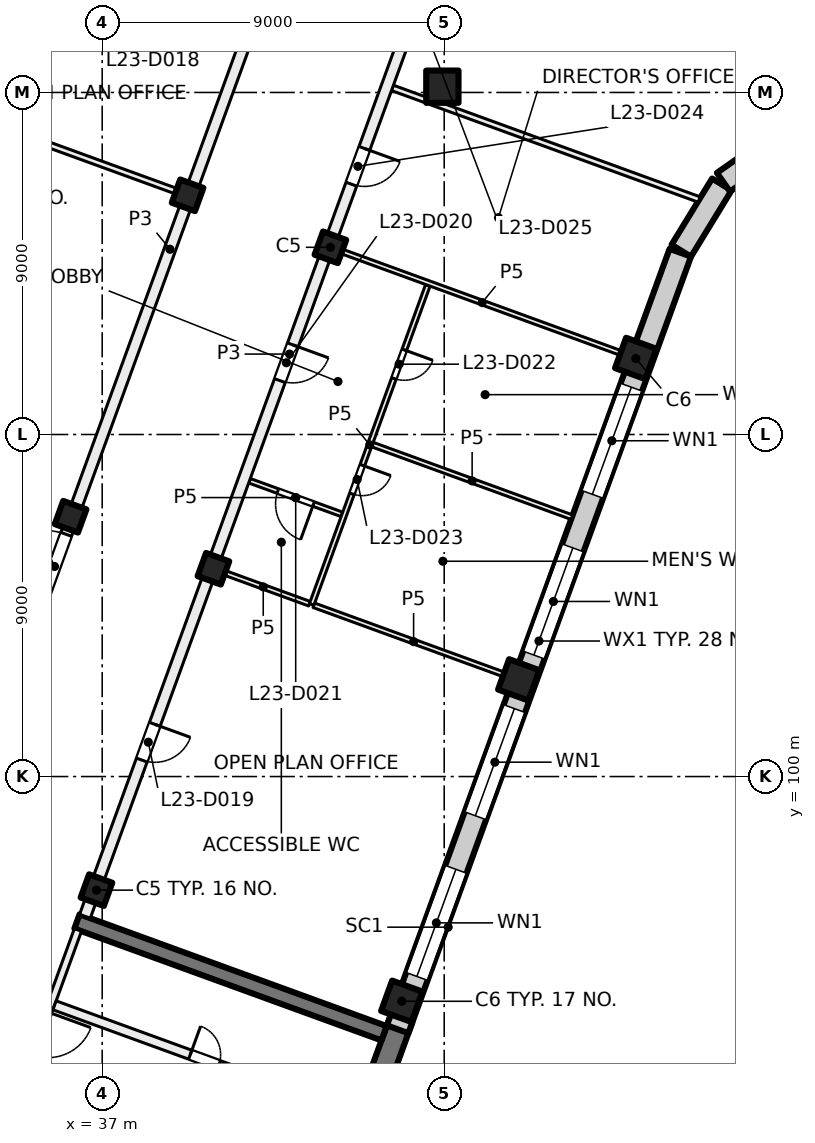
"""IFC4 building model, lengths in metres.
Left out: names, types, materials, properties, quantities, classifications, styles, units other than length and angle.
Written with IfcOpenShell. Run it as: python <this file> out.ifc"""

import sys

from ifc_helpers import new_model, si_unit, direction, frame, frame_2d, origin, origin_2d, place, context, subcontext, project, spatial, rectangle, extrude, element, fill, save


model = new_model("IFC4")
c1 = context("Model", 3, precision=1e-05, world=origin(), true_north=direction((0.0, 1.0)))
c2 = subcontext(c1, "Body", "Model", "MODEL_VIEW")
j1 = project(units=[si_unit("LENGTHUNIT", "METRE"), si_unit("PLANEANGLEUNIT", "RADIAN")], contexts=[c1])
p1 = place(None, origin())
s1 = spatial("IfcSite", under=j1, at=p1, CompositionType="ELEMENT")
p2 = place(p1, origin())
s2 = spatial("IfcBuilding", under=s1, at=p2, CompositionType="ELEMENT")
p3 = place(p2, frame((0.0, 0.0, 101.0)))
s3 = spatial("IfcBuildingStorey", under=s2, at=p3, CompositionType="ELEMENT", Elevation=101.0)
p4 = place(p3, frame((45.952, 118.152, 0.0), z_axis=(0.0, 0.0, 1.0), x_axis=(1.0, 0.0, 0.0)))
e1 = element("IfcColumn", 1, at=p4, inside=s3, PredefinedType="COLUMN", context=c2, shape_type="SweptSolid", body=[
    extrude(rectangle(XDim=0.85, YDim=0.85, at=origin_2d()), origin(), (0.0, 0.0, 1.0), 4.0),
])
for number, where, z_axis, x_axis in (
    (2, (43.006, 113.925, 0.0), (0.0, 0.0, 1.0), (-0.342, -0.94, 0.0)),
    (3, (39.927, 105.468, 0.0), (0.0, 0.0, 1.0), (-0.342, -0.94, 0.0)),
    (4, (36.849, 97.011, 0.0), (0.0, 0.0, 1.0), (-0.342, -0.94, 0.0)),
    (5, (39.247, 115.293, 0.0), (0.0, 0.0, 1.0), (-0.342, -0.94, 0.0)),
    (6, (36.169, 106.836, 0.0), (0.0, 0.0, 1.0), (-0.342, -0.94, 0.0)),
):
    element("IfcColumn", number, at=place(p3, frame(where, z_axis=z_axis, x_axis=x_axis)), inside=s3, PredefinedType="COLUMN", context=c2, shape_type="SweptSolid", body=[
        extrude(rectangle(XDim=0.65, YDim=0.65, at=origin_2d()), origin(), (0.0, 0.0, 1.0), 4.0),
    ])
for number, where, z_axis, x_axis in (
    (7, (51.04, 111.001, 0.0), (0.0, 0.0, 1.0), (-0.342, -0.94, 0.0)),
    (8, (47.962, 102.544, 0.0), (0.0, 0.0, 1.0), (-0.342, -0.94, 0.0)),
    (9, (44.884, 94.087, 0.0), (0.0, 0.0, 1.0), (-0.342, -0.94, 0.0)),
):
    element("IfcColumn", number, at=place(p3, frame(where, z_axis=z_axis, x_axis=x_axis)), inside=s3, PredefinedType="COLUMN", context=c2, shape_type="SweptSolid", body=[
        extrude(rectangle(XDim=0.85, YDim=0.85, at=origin_2d()), origin(), (0.0, 0.0, 1.0), 4.0),
    ])
p5 = place(p3, frame((41.827, 85.249, 0.0), z_axis=(0.0, 0.0, 1.0), x_axis=(0.342017595281, 0.939693548195, 0.0)))
e10 = element("IfcWall", 10, at=p5, inside=s3, PredefinedType="SHEAR", context=c2, shape_type="SweptSolid", body=[
    extrude(rectangle(XDim=8.925, YDim=0.6, at=frame_2d((4.462, 0.0))), origin(), (0.0, 0.0, 1.0), 4.0),
])
p6 = place(p3, frame((44.418, 93.245, 0.0), z_axis=(0.0, 0.0, 1.0), x_axis=(-0.93969060187, 0.342025690201, 0.0)))
e11 = element("IfcWall", 11, at=p6, inside=s3, PredefinedType="SHEAR", context=c2, shape_type="SweptSolid", body=[
    extrude(rectangle(XDim=8.6, YDim=0.4, at=frame_2d((4.3, 0.0))), origin(), (0.0, 0.0, 1.0), 4.0),
])
p7 = place(p3, frame((52.212, 113.783, 0.0), z_axis=(0.0, 0.0, 1.0), x_axis=(-0.34202521188, -0.939690775968, 0.0)))
e12 = element("IfcWall", 12, at=p7, inside=s3, PredefinedType="SOLIDWALL", context=c2, shape_type="SweptSolid", body=[
    extrude(rectangle(XDim=21.745, YDim=0.6, at=frame_2d((10.873, 0.0))), origin(), (0.0, 0.0, 1.0), 3.625),
])
p8 = place(p7, frame((3.765, 0.0, 0.9)))
e13 = element("IfcOpeningElement", 13, at=p8, cuts=e12, PredefinedType="OPENING", context=c2, shape_type="SweptSolid", body=[
    extrude(rectangle(XDim=3.0, YDim=2.4, at=frame_2d((1.5, 1.2))), frame((0.0, 0.31, 0.0), z_axis=(0.0, -1.0, 0.0), x_axis=(1.0, 0.0, 0.0)), (0.0, 0.0, 1.0), 0.62),
])
p9 = place(p7, frame((8.265, 0.0, 0.9)))
e14 = element("IfcOpeningElement", 14, at=p9, cuts=e12, PredefinedType="OPENING", context=c2, shape_type="SweptSolid", body=[
    extrude(rectangle(XDim=3.0, YDim=2.4, at=frame_2d((1.5, 1.2))), frame((0.0, 0.31, 0.0), z_axis=(0.0, -1.0, 0.0), x_axis=(1.0, 0.0, 0.0)), (0.0, 0.0, 1.0), 0.62),
])
p10 = place(p7, frame((12.765, 0.0, 0.9)))
e15 = element("IfcOpeningElement", 15, at=p10, cuts=e12, PredefinedType="OPENING", context=c2, shape_type="SweptSolid", body=[
    extrude(rectangle(XDim=3.0, YDim=2.4, at=frame_2d((1.5, 1.2))), frame((0.0, 0.31, 0.0), z_axis=(0.0, -1.0, 0.0), x_axis=(1.0, 0.0, 0.0)), (0.0, 0.0, 1.0), 0.62),
])
p11 = place(p7, frame((17.265, 0.0, 0.9)))
e16 = element("IfcOpeningElement", 16, at=p11, cuts=e12, PredefinedType="OPENING", context=c2, shape_type="SweptSolid", body=[
    extrude(rectangle(XDim=3.0, YDim=2.4, at=frame_2d((1.5, 1.2))), frame((0.0, 0.31, 0.0), z_axis=(0.0, -1.0, 0.0), x_axis=(1.0, 0.0, 0.0)), (0.0, 0.0, 1.0), 0.62),
])
p12 = place(p3, frame((53.305, 115.578, 0.0), z_axis=(0.0, 0.0, 1.0), x_axis=(-0.522402266438, -0.852699168535, 0.0)))
e17 = element("IfcWall", 17, at=p12, inside=s3, PredefinedType="SOLIDWALL", context=c2, shape_type="SweptSolid", body=[
    extrude(rectangle(XDim=2.042, YDim=0.6, at=frame_2d((1.021, 0.0))), origin(), (0.0, 0.0, 1.0), 3.625),
])
p13 = place(p3, frame((55.062, 116.839, 0.0), z_axis=(0.0, 0.0, 1.0), x_axis=(-0.819122269495, -0.573618956815, 0.0)))
e18 = element("IfcWall", 18, at=p13, inside=s3, PredefinedType="SOLIDWALL", context=c2, shape_type="SweptSolid", body=[
    extrude(rectangle(XDim=2.092, YDim=0.6, at=frame_2d((1.046, 0.0))), origin(), (0.0, 0.0, 1.0), 3.625),
])
p14 = place(p3, frame((24.666, 100.669, 0.0), z_axis=(0.0, 0.0, 1.0), x_axis=(0.34201964167, 0.939692803373, 0.0)))
e19 = element("IfcWall", 19, at=p14, inside=s3, PredefinedType="SOLIDWALL", context=c2, shape_type="SweptSolid", body=[
    extrude(rectangle(XDim=32.884, YDim=0.6, at=frame_2d((16.442, 0.0))), origin(), (0.0, 0.0, 1.0), 3.625),
])
p15 = place(p14, frame((1.48, 0.0, 0.9)))
e20 = element("IfcOpeningElement", 20, at=p15, cuts=e19, PredefinedType="OPENING", context=c2, shape_type="SweptSolid", body=[
    extrude(rectangle(XDim=3.0, YDim=2.4, at=frame_2d((1.5, 1.2))), frame((0.0, 0.31, 0.0), z_axis=(0.0, -1.0, 0.0), x_axis=(1.0, 0.0, 0.0)), (0.0, 0.0, 1.0), 0.62),
])
p16 = place(p14, frame((5.98, 0.0, 0.9)))
e21 = element("IfcOpeningElement", 21, at=p16, cuts=e19, PredefinedType="OPENING", context=c2, shape_type="SweptSolid", body=[
    extrude(rectangle(XDim=3.0, YDim=2.4, at=frame_2d((1.5, 1.2))), frame((0.0, 0.31, 0.0), z_axis=(0.0, -1.0, 0.0), x_axis=(1.0, 0.0, 0.0)), (0.0, 0.0, 1.0), 0.62),
])
p17 = place(p14, frame((10.48, 0.0, 0.9)))
e22 = element("IfcOpeningElement", 22, at=p17, cuts=e19, PredefinedType="OPENING", context=c2, shape_type="SweptSolid", body=[
    extrude(rectangle(XDim=3.0, YDim=2.4, at=frame_2d((1.5, 1.2))), frame((0.0, 0.31, 0.0), z_axis=(0.0, -1.0, 0.0), x_axis=(1.0, 0.0, 0.0)), (0.0, 0.0, 1.0), 0.62),
])
p18 = place(p14, frame((14.98, 0.0, 0.9)))
e23 = element("IfcOpeningElement", 23, at=p18, cuts=e19, PredefinedType="OPENING", context=c2, shape_type="SweptSolid", body=[
    extrude(rectangle(XDim=3.0, YDim=2.4, at=frame_2d((1.5, 1.2))), frame((0.0, 0.31, 0.0), z_axis=(0.0, -1.0, 0.0), x_axis=(1.0, 0.0, 0.0)), (0.0, 0.0, 1.0), 0.62),
])
p19 = place(p14, frame((19.48, 0.0, 0.9)))
e24 = element("IfcOpeningElement", 24, at=p19, cuts=e19, PredefinedType="OPENING", context=c2, shape_type="SweptSolid", body=[
    extrude(rectangle(XDim=3.0, YDim=2.4, at=frame_2d((1.5, 1.2))), frame((0.0, 0.31, 0.0), z_axis=(0.0, -1.0, 0.0), x_axis=(1.0, 0.0, 0.0)), (0.0, 0.0, 1.0), 0.62),
])
p20 = place(p14, frame((23.98, 0.0, 0.9)))
e25 = element("IfcOpeningElement", 25, at=p20, cuts=e19, PredefinedType="OPENING", context=c2, shape_type="SweptSolid", body=[
    extrude(rectangle(XDim=3.0, YDim=2.4, at=frame_2d((1.5, 1.2))), frame((0.0, 0.31, 0.0), z_axis=(0.0, -1.0, 0.0), x_axis=(1.0, 0.0, 0.0)), (0.0, 0.0, 1.0), 0.62),
])
p21 = place(p14, frame((28.48, 0.0, 0.9)))
e26 = element("IfcOpeningElement", 26, at=p21, cuts=e19, PredefinedType="OPENING", context=c2, shape_type="SweptSolid", body=[
    extrude(rectangle(XDim=3.0, YDim=2.4, at=frame_2d((1.5, 1.2))), frame((0.0, 0.31, 0.0), z_axis=(0.0, -1.0, 0.0), x_axis=(1.0, 0.0, 0.0)), (0.0, 0.0, 1.0), 0.62),
])
p22 = place(p3, frame((36.362, 95.964, 0.0), z_axis=(0.0, 0.0, 1.0), x_axis=(-0.341995824804, -0.939701471648, 0.0)))
e27 = element("IfcWall", 27, at=p22, inside=s3, PredefinedType="PARTITIONING", context=c2, shape_type="SweptSolid", body=[
    extrude(rectangle(XDim=3.8, YDim=0.2, at=frame_2d((1.9, 0.0))), origin(), (0.0, 0.0, 1.0), 3.625),
])
p23 = place(p22, frame((2.3, 0.0, 0.0)))
e28 = element("IfcOpeningElement", 28, at=p23, cuts=e27, PredefinedType="OPENING", context=c2, shape_type="SweptSolid", body=[
    extrude(rectangle(XDim=1.2, YDim=2.1, at=frame_2d((0.6, 1.05))), frame((0.0, 0.11, 0.0), z_axis=(0.0, -1.0, 0.0), x_axis=(1.0, 0.0, 0.0)), (0.0, 0.0, 1.0), 0.22),
])
p24 = place(p3, frame((35.19, 92.453, 0.0), z_axis=(0.0, 0.0, 1.0), x_axis=(0.939691552312, -0.342023078919, 0.0)))
e29 = element("IfcWall", 29, at=p24, inside=s3, PredefinedType="PARTITIONING", context=c2, shape_type="SweptSolid", body=[
    extrude(rectangle(XDim=8.4, YDim=0.2, at=frame_2d((4.2, 0.0))), origin(), (0.0, 0.0, 1.0), 3.625),
])
p25 = place(p24, frame((5.25, 0.0, 0.0)))
e30 = element("IfcOpeningElement", 30, at=p25, cuts=e29, PredefinedType="OPENING", context=c2, shape_type="SweptSolid", body=[
    extrude(rectangle(XDim=1.5, YDim=2.1, at=frame_2d((0.75, 1.05))), frame((0.0, 0.11, 0.0), z_axis=(0.0, -1.0, 0.0), x_axis=(1.0, 0.0, 0.0)), (0.0, 0.0, 1.0), 0.22),
])
p26 = place(p3, frame((35.746, 93.98, 0.0), z_axis=(0.0, 0.0, 1.0), x_axis=(0.939691552312, -0.342023078919, 0.0)))
e31 = element("IfcWall", 31, at=p26, inside=s3, PredefinedType="PARTITIONING", context=c2, shape_type="SweptSolid", body=[
    extrude(rectangle(XDim=8.4, YDim=0.25, at=frame_2d((4.2, 0.0))), origin(), (0.0, 0.0, 1.0), 3.625),
])
p27 = place(p26, frame((3.8, 0.0, 0.0)))
e32 = element("IfcOpeningElement", 32, at=p27, cuts=e31, PredefinedType="OPENING", context=c2, shape_type="SweptSolid", body=[
    extrude(rectangle(XDim=0.8, YDim=2.1, at=frame_2d((0.4, 1.05))), frame((0.0, 0.135, 0.0), z_axis=(0.0, -1.0, 0.0), x_axis=(1.0, 0.0, 0.0)), (0.0, 0.0, 1.0), 0.27),
])
p28 = place(p3, frame((31.353, 118.166, 0.0), z_axis=(0.0, 0.0, 1.0), x_axis=(0.939687752599, -0.342033518263, 0.0)))
e33 = element("IfcWall", 33, at=p28, inside=s3, PredefinedType="PARTITIONING", context=c2, shape_type="SweptSolid", body=[
    extrude(rectangle(XDim=8.301, YDim=0.15, at=frame_2d((4.15, 0.0))), origin(), (0.0, 0.0, 1.0), 3.625),
])
p29 = place(p3, frame((32.881, 97.657, 0.0), z_axis=(0.0, 0.0, 1.0), x_axis=(0.342017360004, 0.939693633828, 0.0)))
e34 = element("IfcWall", 34, at=p29, inside=s3, PredefinedType="PARTITIONING", context=c2, shape_type="SweptSolid", body=[
    extrude(rectangle(XDim=34.516, YDim=0.3, at=frame_2d((17.258, 0.0))), origin(), (0.0, 0.0, 1.0), 3.625),
])
p30 = place(p29, frame((7.475, 0.0, 0.0)))
e35 = element("IfcOpeningElement", 35, at=p30, cuts=e34, PredefinedType="OPENING", context=c2, shape_type="SweptSolid", body=[
    extrude(rectangle(XDim=1.8, YDim=2.1, at=frame_2d((0.9, 1.05))), frame((0.0, 0.16, 0.0), z_axis=(0.0, -1.0, 0.0), x_axis=(1.0, 0.0, 0.0)), (0.0, 0.0, 1.0), 0.32),
])
p31 = place(p29, frame((25.0, 0.0, 0.0)))
e36 = element("IfcOpeningElement", 36, at=p31, cuts=e34, PredefinedType="OPENING", context=c2, shape_type="SweptSolid", body=[
    extrude(rectangle(XDim=1.0, YDim=2.1, at=frame_2d((0.5, 1.05))), frame((0.0, 0.16, 0.0), z_axis=(0.0, -1.0, 0.0), x_axis=(1.0, 0.0, 0.0)), (0.0, 0.0, 1.0), 0.32),
])
p32 = place(p29, frame((29.779, 0.0, 0.0)))
e37 = element("IfcOpeningElement", 37, at=p32, cuts=e34, PredefinedType="OPENING", context=c2, shape_type="SweptSolid", body=[
    extrude(rectangle(XDim=1.8, YDim=2.1, at=frame_2d((0.9, 1.05))), frame((0.0, 0.16, 0.0), z_axis=(0.0, -1.0, 0.0), x_axis=(1.0, 0.0, 0.0)), (0.0, 0.0, 1.0), 0.32),
])
p33 = place(p3, frame((40.021, 105.434, 0.0), z_axis=(0.0, 0.0, 1.0), x_axis=(0.939564838351, -0.342371018829, 0.0)))
e38 = element("IfcWall", 38, at=p33, inside=s3, PredefinedType="PARTITIONING", context=c2, shape_type="SweptSolid", body=[
    extrude(rectangle(XDim=2.591, YDim=0.125, at=frame_2d((1.295, 0.0))), origin(), (0.0, 0.0, 1.0), 3.625),
])
p34 = place(p3, frame((43.308, 106.898, 0.0), z_axis=(0.0, 0.0, 1.0), x_axis=(-0.93971903862, 0.341947552198, 0.0)))
e39 = element("IfcWall", 39, at=p34, inside=s3, PredefinedType="PARTITIONING", context=c2, shape_type="SweptSolid", body=[
    extrude(rectangle(XDim=2.588, YDim=0.125, at=frame_2d((1.294, 0.0))), origin(), (0.0, 0.0, 1.0), 3.625),
])
p35 = place(p34, frame((0.794, 0.0, 0.0)))
e40 = element("IfcOpeningElement", 40, at=p35, cuts=e39, PredefinedType="OPENING", context=c2, shape_type="SweptSolid", body=[
    extrude(rectangle(XDim=1.0, YDim=2.1, at=frame_2d((0.5, 1.05))), frame((0.0, 0.073, 0.0), z_axis=(0.0, -1.0, 0.0), x_axis=(1.0, 0.0, 0.0)), (0.0, 0.0, 1.0), 0.145),
])
p36 = place(p3, frame((42.568, 104.507, 0.0), z_axis=(0.0, 0.0, 1.0), x_axis=(0.939681160367, -0.342051628927, 0.0)))
e41 = element("IfcWall", 41, at=p36, inside=s3, PredefinedType="PARTITIONING", context=c2, shape_type="SweptSolid", body=[
    extrude(rectangle(XDim=5.59, YDim=0.125, at=frame_2d((2.795, 0.0))), origin(), (0.0, 0.0, 1.0), 3.625),
])
p37 = place(p3, frame((45.569, 112.926, 0.0), z_axis=(0.0, 0.0, 1.0), x_axis=(-0.342072050759, -0.939673726402, 0.0)))
e42 = element("IfcWall", 42, at=p37, inside=s3, PredefinedType="PARTITIONING", context=c2, shape_type="SweptSolid", body=[
    extrude(rectangle(XDim=8.937, YDim=0.125, at=frame_2d((4.469, 0.0))), origin(), (0.0, 0.0, 1.0), 3.625),
])
p38 = place(p37, frame((1.809, 0.0, 0.0)))
e43 = element("IfcOpeningElement", 43, at=p38, cuts=e42, PredefinedType="OPENING", context=c2, shape_type="SweptSolid", body=[
    extrude(rectangle(XDim=0.8, YDim=2.1, at=frame_2d((0.4, 1.05))), frame((0.0, 0.073, 0.0), z_axis=(0.0, -1.0, 0.0), x_axis=(1.0, 0.0, 0.0)), (0.0, 0.0, 1.0), 0.145),
])
p39 = place(p37, frame((5.039, 0.0, 0.0)))
e44 = element("IfcOpeningElement", 44, at=p39, cuts=e42, PredefinedType="OPENING", context=c2, shape_type="SweptSolid", body=[
    extrude(rectangle(XDim=0.8, YDim=2.1, at=frame_2d((0.4, 1.05))), frame((0.0, 0.073, 0.0), z_axis=(0.0, -1.0, 0.0), x_axis=(1.0, 0.0, 0.0)), (0.0, 0.0, 1.0), 0.145),
])
p40 = place(p3, frame((43.1, 113.891, 0.0), z_axis=(0.0, 0.0, 1.0), x_axis=(0.939670544866, -0.342080790328, 0.0)))
e45 = element("IfcWall", 45, at=p40, inside=s3, PredefinedType="PARTITIONING", context=c2, shape_type="SweptSolid", body=[
    extrude(rectangle(XDim=8.3, YDim=0.125, at=frame_2d((4.15, 0.0))), origin(), (0.0, 0.0, 1.0), 3.625),
])
p41 = place(p3, frame((44.11, 108.735, 0.0), z_axis=(0.0, 0.0, 1.0), x_axis=(0.93967599021, -0.342065832002, 0.0)))
e46 = element("IfcWall", 46, at=p41, inside=s3, PredefinedType="PARTITIONING", context=c2, shape_type="SweptSolid", body=[
    extrude(rectangle(XDim=5.587, YDim=0.125, at=frame_2d((2.793, 0.0))), origin(), (0.0, 0.0, 1.0), 3.625),
])
p42 = place(p3, frame((44.639, 118.12, 0.0), z_axis=(0.0, 0.0, 1.0), x_axis=(0.939669707102, -0.342083091593, 0.0)))
e47 = element("IfcWall", 47, at=p42, inside=s3, PredefinedType="PARTITIONING", context=c2, shape_type="SweptSolid", body=[
    extrude(rectangle(XDim=8.589, YDim=0.15, at=frame_2d((4.295, 0.0))), origin(), (0.0, 0.0, 1.0), 3.625),
])
p43 = place(p3, frame((47.314, 125.909, 0.0), z_axis=(0.0, 0.0, 1.0), x_axis=(-0.342010770371, -0.939696032209, 0.0)))
e48 = element("IfcWall", 48, at=p43, inside=s3, PredefinedType="PARTITIONING", context=c2, shape_type="SweptSolid", body=[
    extrude(rectangle(XDim=31.485, YDim=0.3, at=frame_2d((15.742, 0.0))), origin(), (0.0, 0.0, 1.0), 3.625),
])
p44 = place(p43, frame((26.11, 0.0, 0.0)))
e49 = element("IfcOpeningElement", 49, at=p44, cuts=e48, PredefinedType="OPENING", context=c2, shape_type="SweptSolid", body=[
    extrude(rectangle(XDim=1.0, YDim=2.1, at=frame_2d((0.5, 1.05))), frame((0.0, 0.16, 0.0), z_axis=(0.0, -1.0, 0.0), x_axis=(1.0, 0.0, 0.0)), (0.0, 0.0, 1.0), 0.32),
])
p45 = place(p43, frame((15.485, 0.0, 0.0)))
e50 = element("IfcOpeningElement", 50, at=p45, cuts=e48, PredefinedType="OPENING", context=c2, shape_type="SweptSolid", body=[
    extrude(rectangle(XDim=1.0, YDim=2.1, at=frame_2d((0.5, 1.05))), frame((0.0, 0.16, 0.0), z_axis=(0.0, -1.0, 0.0), x_axis=(1.0, 0.0, 0.0)), (0.0, 0.0, 1.0), 0.32),
])
p46 = place(p43, frame((9.985, 0.0, 0.0)))
e51 = element("IfcOpeningElement", 51, at=p46, cuts=e48, PredefinedType="OPENING", context=c2, shape_type="SweptSolid", body=[
    extrude(rectangle(XDim=1.0, YDim=2.1, at=frame_2d((0.5, 1.05))), frame((0.0, 0.16, 0.0), z_axis=(0.0, -1.0, 0.0), x_axis=(1.0, 0.0, 0.0)), (0.0, 0.0, 1.0), 0.32),
])
p47 = place(p43, frame((5.484, 0.0, 0.0)))
e52 = element("IfcOpeningElement", 52, at=p47, cuts=e48, PredefinedType="OPENING", context=c2, shape_type="SweptSolid", body=[
    extrude(rectangle(XDim=1.0, YDim=2.1, at=frame_2d((0.5, 1.05))), frame((0.0, 0.16, 0.0), z_axis=(0.0, -1.0, 0.0), x_axis=(1.0, 0.0, 0.0)), (0.0, 0.0, 1.0), 0.32),
])
p48 = place(p8, origin())
e53 = element("IfcWindow", 53, at=p48, inside=s3, PartitioningType="SINGLE_PANEL", PredefinedType="WINDOW", context=c2, shape_type="SweptSolid", body=[
    extrude(rectangle(XDim=3.0, YDim=2.4, at=frame_2d((1.5, 1.2))), frame((0.0, 0.03, 0.0), z_axis=(0.0, -1.0, 0.0), x_axis=(1.0, 0.0, 0.0)), (0.0, 0.0, 1.0), 0.06),
])
fill(e13, e53)
p49 = place(p9, origin())
e54 = element("IfcWindow", 54, at=p49, inside=s3, PartitioningType="SINGLE_PANEL", PredefinedType="WINDOW", context=c2, shape_type="SweptSolid", body=[
    extrude(rectangle(XDim=3.0, YDim=2.4, at=frame_2d((1.5, 1.2))), frame((0.0, 0.03, 0.0), z_axis=(0.0, -1.0, 0.0), x_axis=(1.0, 0.0, 0.0)), (0.0, 0.0, 1.0), 0.06),
])
fill(e14, e54)
p50 = place(p10, origin())
e55 = element("IfcWindow", 55, at=p50, inside=s3, PartitioningType="SINGLE_PANEL", PredefinedType="WINDOW", context=c2, shape_type="SweptSolid", body=[
    extrude(rectangle(XDim=3.0, YDim=2.4, at=frame_2d((1.5, 1.2))), frame((0.0, 0.03, 0.0), z_axis=(0.0, -1.0, 0.0), x_axis=(1.0, 0.0, 0.0)), (0.0, 0.0, 1.0), 0.06),
])
fill(e15, e55)
p51 = place(p11, origin())
e56 = element("IfcWindow", 56, at=p51, inside=s3, PartitioningType="SINGLE_PANEL", PredefinedType="WINDOW", context=c2, shape_type="SweptSolid", body=[
    extrude(rectangle(XDim=3.0, YDim=2.4, at=frame_2d((1.5, 1.2))), frame((0.0, 0.03, 0.0), z_axis=(0.0, -1.0, 0.0), x_axis=(1.0, 0.0, 0.0)), (0.0, 0.0, 1.0), 0.06),
])
fill(e16, e56)
p52 = place(p27, origin())
e57 = element("IfcDoor", 57, at=p52, inside=s3, OperationType="SINGLE_SWING_RIGHT", PredefinedType="DOOR", context=c2, shape_type="SweptSolid", body=[
    extrude(rectangle(XDim=0.8, YDim=2.1, at=frame_2d((0.4, 1.05))), frame((0.0, 0.025, 0.0), z_axis=(0.0, -1.0, 0.0), x_axis=(1.0, 0.0, 0.0)), (0.0, 0.0, 1.0), 0.05),
])
fill(e32, e57)
p53 = place(p30, origin())
e58 = element("IfcDoor", 58, at=p53, inside=s3, OperationType="DOUBLE_DOOR_SINGLE_SWING", PredefinedType="DOOR", context=c2, shape_type="SweptSolid", body=[
    extrude(rectangle(XDim=1.8, YDim=2.1, at=frame_2d((0.9, 1.05))), frame((0.0, 0.025, 0.0), z_axis=(0.0, -1.0, 0.0), x_axis=(1.0, 0.0, 0.0)), (0.0, 0.0, 1.0), 0.05),
])
fill(e35, e58)
p54 = place(p44, origin())
e59 = element("IfcDoor", 59, at=p54, inside=s3, OperationType="SINGLE_SWING_RIGHT", PredefinedType="DOOR", context=c2, shape_type="SweptSolid", body=[
    extrude(rectangle(XDim=1.0, YDim=2.1, at=frame_2d((0.5, 1.05))), frame((0.0, 0.025, 0.0), z_axis=(0.0, -1.0, 0.0), x_axis=(1.0, 0.0, 0.0)), (0.0, 0.0, 1.0), 0.05),
])
fill(e49, e59)
p55 = place(p45, origin())
e60 = element("IfcDoor", 60, at=p55, inside=s3, OperationType="SINGLE_SWING_LEFT", PredefinedType="DOOR", context=c2, shape_type="SweptSolid", body=[
    extrude(rectangle(XDim=1.0, YDim=2.1, at=frame_2d((0.5, 1.05))), frame((0.0, 0.025, 0.0), z_axis=(0.0, -1.0, 0.0), x_axis=(1.0, 0.0, 0.0)), (0.0, 0.0, 1.0), 0.05),
])
fill(e50, e60)
p56 = place(p35, origin())
e61 = element("IfcDoor", 61, at=p56, inside=s3, OperationType="SINGLE_SWING_RIGHT", PredefinedType="DOOR", context=c2, shape_type="SweptSolid", body=[
    extrude(rectangle(XDim=1.0, YDim=2.1, at=frame_2d((0.5, 1.05))), frame((0.0, 0.025, 0.0), z_axis=(0.0, -1.0, 0.0), x_axis=(1.0, 0.0, 0.0)), (0.0, 0.0, 1.0), 0.05),
])
fill(e40, e61)
p57 = place(p38, origin())
e62 = element("IfcDoor", 62, at=p57, inside=s3, OperationType="SINGLE_SWING_RIGHT", PredefinedType="DOOR", context=c2, shape_type="SweptSolid", body=[
    extrude(rectangle(XDim=0.8, YDim=2.1, at=frame_2d((0.4, 1.05))), frame((0.0, 0.025, 0.0), z_axis=(0.0, -1.0, 0.0), x_axis=(1.0, 0.0, 0.0)), (0.0, 0.0, 1.0), 0.05),
])
fill(e43, e62)
p58 = place(p39, origin())
e63 = element("IfcDoor", 63, at=p58, inside=s3, OperationType="SINGLE_SWING_LEFT", PredefinedType="DOOR", context=c2, shape_type="SweptSolid", body=[
    extrude(rectangle(XDim=0.8, YDim=2.1, at=frame_2d((0.4, 1.05))), frame((0.0, 0.025, 0.0), z_axis=(0.0, -1.0, 0.0), x_axis=(1.0, 0.0, 0.0)), (0.0, 0.0, 1.0), 0.05),
])
fill(e44, e63)
p59 = place(p46, origin())
e64 = element("IfcDoor", 64, at=p59, inside=s3, OperationType="SINGLE_SWING_LEFT", PredefinedType="DOOR", context=c2, shape_type="SweptSolid", body=[
    extrude(rectangle(XDim=1.0, YDim=2.1, at=frame_2d((0.5, 1.05))), frame((0.0, 0.025, 0.0), z_axis=(0.0, -1.0, 0.0), x_axis=(1.0, 0.0, 0.0)), (0.0, 0.0, 1.0), 0.05),
])
fill(e51, e64)
save(model, sys.argv[1])
